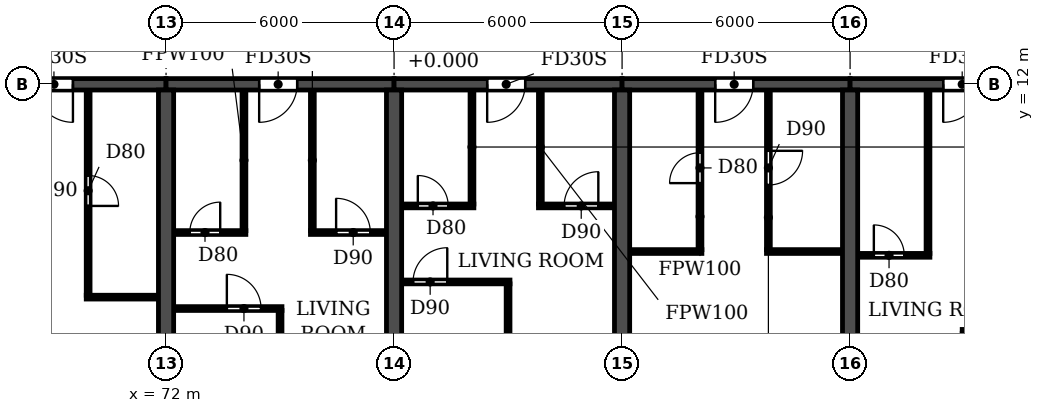
"""IFC4 building model, lengths in metres.
Left out: names, types, materials, properties, quantities, classifications, styles, units other than length and angle.
Written with IfcOpenShell. Run it as: python <this file> out.ifc"""

import sys

from ifc_helpers import new_model, si_unit, direction, frame, frame_2d, origin, place, context, subcontext, project, spatial, rectangle, extrude, element, fill, save


model = new_model("IFC4")
c1 = context("Model", 3, precision=1e-05, world=origin(), true_north=direction((0.0, 1.0)))
c2 = subcontext(c1, "Body", "Model", "MODEL_VIEW")
j1 = project(units=[si_unit("LENGTHUNIT", "METRE"), si_unit("PLANEANGLEUNIT", "RADIAN")], contexts=[c1])
p1 = place(None, origin())
s1 = spatial("IfcSite", under=j1, at=p1, CompositionType="ELEMENT")
p2 = place(p1, origin())
s2 = spatial("IfcBuilding", under=s1, at=p2, CompositionType="ELEMENT")
p3 = place(p2, frame((0.0, 0.0, 43.2)))
s3 = spatial("IfcBuildingStorey", under=s2, at=p3, CompositionType="ELEMENT", Elevation=43.2)
for number, where, z_axis, x_axis in (
    (1, (72.0, 0.2, 0.0), (0.0, 0.0, 1.0), (0.0, 1.0, 0.0)),
    (2, (78.0, 0.2, 0.0), (0.0, 0.0, 1.0), (0.0, 1.0, 0.0)),
    (3, (84.0, 0.2, 0.0), (0.0, 0.0, 1.0), (0.0, 1.0, 0.0)),
    (4, (90.0, 0.2, 0.0), (0.0, 0.0, 1.0), (0.0, 1.0, 0.0)),
):
    element("IfcWall", number, at=place(p3, frame(where, z_axis=z_axis, x_axis=x_axis)), inside=s3, PredefinedType="SHEAR", context=c2, shape_type="SweptSolid", body=[
        extrude(rectangle(XDim=11.65, YDim=0.4, at=frame_2d((5.825, 0.0))), origin(), (0.0, 0.0, 1.0), 3.05),
    ])
p4 = place(p3, frame((66.0, 12.0, 0.0), z_axis=(0.0, 0.0, 1.0), x_axis=(1.0, 0.0, 0.0)))
e5 = element("IfcWall", 5, at=p4, inside=s3, PredefinedType="SHEAR", context=c2, shape_type="SweptSolid", body=[
    extrude(rectangle(XDim=6.0, YDim=0.3, at=frame_2d((3.0, 0.0))), origin(), (0.0, 0.0, 1.0), 2.45),
])
p5 = place(p4, frame((2.55, 0.0, 0.0)))
e6 = element("IfcOpeningElement", 6, at=p5, cuts=e5, PredefinedType="OPENING", context=c2, shape_type="SweptSolid", body=[
    extrude(rectangle(XDim=1.0, YDim=2.1, at=frame_2d((0.5, 1.05))), frame((0.0, 0.16, 0.0), z_axis=(0.0, -1.0, 0.0), x_axis=(1.0, 0.0, 0.0)), (0.0, 0.0, 1.0), 0.32),
])
p6 = place(p3, frame((72.0, 12.0, 0.0), z_axis=(0.0, 0.0, 1.0), x_axis=(1.0, 0.0, 0.0)))
e7 = element("IfcWall", 7, at=p6, inside=s3, PredefinedType="SHEAR", context=c2, shape_type="SweptSolid", body=[
    extrude(rectangle(XDim=6.0, YDim=0.3, at=frame_2d((3.0, 0.0))), origin(), (0.0, 0.0, 1.0), 2.45),
])
p7 = place(p6, frame((2.45, 0.0, 0.0)))
e8 = element("IfcOpeningElement", 8, at=p7, cuts=e7, PredefinedType="OPENING", context=c2, shape_type="SweptSolid", body=[
    extrude(rectangle(XDim=1.0, YDim=2.1, at=frame_2d((0.5, 1.05))), frame((0.0, 0.16, 0.0), z_axis=(0.0, -1.0, 0.0), x_axis=(1.0, 0.0, 0.0)), (0.0, 0.0, 1.0), 0.32),
])
p8 = place(p3, frame((78.0, 12.0, 0.0), z_axis=(0.0, 0.0, 1.0), x_axis=(1.0, 0.0, 0.0)))
e9 = element("IfcWall", 9, at=p8, inside=s3, PredefinedType="SHEAR", context=c2, shape_type="SweptSolid", body=[
    extrude(rectangle(XDim=6.0, YDim=0.3, at=frame_2d((3.0, 0.0))), origin(), (0.0, 0.0, 1.0), 2.45),
])
p9 = place(p8, frame((2.45, 0.0, 0.0)))
e10 = element("IfcOpeningElement", 10, at=p9, cuts=e9, PredefinedType="OPENING", context=c2, shape_type="SweptSolid", body=[
    extrude(rectangle(XDim=1.0, YDim=2.1, at=frame_2d((0.5, 1.05))), frame((0.0, 0.16, 0.0), z_axis=(0.0, -1.0, 0.0), x_axis=(1.0, 0.0, 0.0)), (0.0, 0.0, 1.0), 0.32),
])
p10 = place(p3, frame((84.0, 12.0, 0.0), z_axis=(0.0, 0.0, 1.0), x_axis=(1.0, 0.0, 0.0)))
e11 = element("IfcWall", 11, at=p10, inside=s3, PredefinedType="SHEAR", context=c2, shape_type="SweptSolid", body=[
    extrude(rectangle(XDim=6.0, YDim=0.3, at=frame_2d((3.0, 0.0))), origin(), (0.0, 0.0, 1.0), 2.45),
])
p11 = place(p10, frame((2.45, 0.0, 0.0)))
e12 = element("IfcOpeningElement", 12, at=p11, cuts=e11, PredefinedType="OPENING", context=c2, shape_type="SweptSolid", body=[
    extrude(rectangle(XDim=1.0, YDim=2.1, at=frame_2d((0.5, 1.05))), frame((0.0, 0.16, 0.0), z_axis=(0.0, -1.0, 0.0), x_axis=(1.0, 0.0, 0.0)), (0.0, 0.0, 1.0), 0.32),
])
p12 = place(p3, frame((90.0, 12.0, 0.0), z_axis=(0.0, 0.0, 1.0), x_axis=(1.0, 0.0, 0.0)))
e13 = element("IfcWall", 13, at=p12, inside=s3, PredefinedType="SHEAR", context=c2, shape_type="SweptSolid", body=[
    extrude(rectangle(XDim=6.0, YDim=0.3, at=frame_2d((3.0, 0.0))), origin(), (0.0, 0.0, 1.0), 2.45),
])
p13 = place(p12, frame((2.45, 0.0, 0.0)))
e14 = element("IfcOpeningElement", 14, at=p13, cuts=e13, PredefinedType="OPENING", context=c2, shape_type="SweptSolid", body=[
    extrude(rectangle(XDim=1.0, YDim=2.1, at=frame_2d((0.5, 1.05))), frame((0.0, 0.16, 0.0), z_axis=(0.0, -1.0, 0.0), x_axis=(1.0, 0.0, 0.0)), (0.0, 0.0, 1.0), 0.32),
])
p14 = place(p3, frame((92.95, 5.5, 0.0), z_axis=(0.0, 0.0, 1.0), x_axis=(1.0, 0.0, 0.0)))
e15 = element("IfcWall", 15, at=p14, inside=s3, PredefinedType="PARTITIONING", context=c2, shape_type="SweptSolid", body=[
    extrude(rectangle(XDim=2.84, YDim=0.1, at=frame_2d((1.42, 0.0))), origin(), (0.0, 0.0, 1.0), 3.05),
])
p15 = place(p14, frame((1.65, 0.0, 0.0)))
e16 = element("IfcOpeningElement", 16, at=p15, cuts=e15, PredefinedType="OPENING", context=c2, shape_type="SweptSolid", body=[
    extrude(rectangle(XDim=0.9, YDim=2.1, at=frame_2d((0.45, 1.05))), frame((0.0, 0.06, 0.0), z_axis=(0.0, -1.0, 0.0), x_axis=(1.0, 0.0, 0.0)), (0.0, 0.0, 1.0), 0.12),
])
p16 = place(p3, frame((72.21, 6.1, 0.0), z_axis=(0.0, 0.0, 1.0), x_axis=(1.0, 0.0, 0.0)))
e17 = element("IfcWall", 17, at=p16, inside=s3, PredefinedType="PARTITIONING", context=c2, shape_type="SweptSolid", body=[
    extrude(rectangle(XDim=2.84, YDim=0.1, at=frame_2d((1.42, 0.0))), origin(), (0.0, 0.0, 1.0), 3.05),
])
p17 = place(p16, frame((1.39, 0.0, 0.0)))
e18 = element("IfcOpeningElement", 18, at=p17, cuts=e17, PredefinedType="OPENING", context=c2, shape_type="SweptSolid", body=[
    extrude(rectangle(XDim=0.9, YDim=2.1, at=frame_2d((0.45, 1.05))), frame((0.0, 0.06, 0.0), z_axis=(0.0, -1.0, 0.0), x_axis=(1.0, 0.0, 0.0)), (0.0, 0.0, 1.0), 0.12),
])
p18 = place(p3, frame((69.9, 6.4, 0.0), z_axis=(0.0, 0.0, 1.0), x_axis=(1.0, 0.0, 0.0)))
e19 = element("IfcWall", 19, at=p18, inside=s3, PredefinedType="PARTITIONING", context=c2, shape_type="SweptSolid", body=[
    extrude(rectangle(XDim=1.89, YDim=0.1, at=frame_2d((0.945, 0.0))), origin(), (0.0, 0.0, 1.0), 3.05),
])
p19 = place(p3, frame((78.21, 6.8, 0.0), z_axis=(0.0, 0.0, 1.0), x_axis=(1.0, 0.0, 0.0)))
e20 = element("IfcWall", 20, at=p19, inside=s3, PredefinedType="PARTITIONING", context=c2, shape_type="SweptSolid", body=[
    extrude(rectangle(XDim=2.84, YDim=0.1, at=frame_2d((1.42, 0.0))), origin(), (0.0, 0.0, 1.0), 3.05),
])
p20 = place(p19, frame((0.29, 0.0, 0.0)))
e21 = element("IfcOpeningElement", 21, at=p20, cuts=e20, PredefinedType="OPENING", context=c2, shape_type="SweptSolid", body=[
    extrude(rectangle(XDim=0.9, YDim=2.1, at=frame_2d((0.45, 1.05))), frame((0.0, 0.06, 0.0), z_axis=(0.0, -1.0, 0.0), x_axis=(1.0, 0.0, 0.0)), (0.0, 0.0, 1.0), 0.12),
])
p21 = place(p3, frame((90.21, 7.5, 0.0), z_axis=(0.0, 0.0, 1.0), x_axis=(1.0, 0.0, 0.0)))
e22 = element("IfcWall", 22, at=p21, inside=s3, PredefinedType="PARTITIONING", context=c2, shape_type="SweptSolid", body=[
    extrude(rectangle(XDim=1.89, YDim=0.1, at=frame_2d((0.945, 0.0))), origin(), (0.0, 0.0, 1.0), 3.05),
])
p22 = place(p21, frame((0.415, 0.0, 0.0)))
e23 = element("IfcOpeningElement", 23, at=p22, cuts=e22, PredefinedType="OPENING", context=c2, shape_type="SweptSolid", body=[
    extrude(rectangle(XDim=0.8, YDim=2.1, at=frame_2d((0.4, 1.05))), frame((0.0, 0.06, 0.0), z_axis=(0.0, -1.0, 0.0), x_axis=(1.0, 0.0, 0.0)), (0.0, 0.0, 1.0), 0.12),
])
p23 = place(p3, frame((84.21, 7.6, 0.0), z_axis=(0.0, 0.0, 1.0), x_axis=(1.0, 0.0, 0.0)))
e24 = element("IfcWall", 24, at=p23, inside=s3, PredefinedType="PARTITIONING", context=c2, shape_type="SweptSolid", body=[
    extrude(rectangle(XDim=1.89, YDim=0.1, at=frame_2d((0.945, 0.0))), origin(), (0.0, 0.0, 1.0), 3.05),
])
p24 = place(p3, frame((87.8, 7.6, 0.0), z_axis=(0.0, 0.0, 1.0), x_axis=(1.0, 0.0, 0.0)))
e25 = element("IfcWall", 25, at=p24, inside=s3, PredefinedType="PARTITIONING", context=c2, shape_type="SweptSolid", body=[
    extrude(rectangle(XDim=1.99, YDim=0.1, at=frame_2d((0.995, 0.0))), origin(), (0.0, 0.0, 1.0), 3.05),
])
p25 = place(p3, frame((72.21, 8.1, 0.0), z_axis=(0.0, 0.0, 1.0), x_axis=(1.0, 0.0, 0.0)))
e26 = element("IfcWall", 26, at=p25, inside=s3, PredefinedType="PARTITIONING", context=c2, shape_type="SweptSolid", body=[
    extrude(rectangle(XDim=1.89, YDim=0.1, at=frame_2d((0.945, 0.0))), origin(), (0.0, 0.0, 1.0), 3.05),
])
p26 = place(p25, frame((0.415, 0.0, 0.0)))
e27 = element("IfcOpeningElement", 27, at=p26, cuts=e26, PredefinedType="OPENING", context=c2, shape_type="SweptSolid", body=[
    extrude(rectangle(XDim=0.8, YDim=2.1, at=frame_2d((0.4, 1.05))), frame((0.0, 0.06, 0.0), z_axis=(0.0, -1.0, 0.0), x_axis=(1.0, 0.0, 0.0)), (0.0, 0.0, 1.0), 0.12),
])
p27 = place(p3, frame((75.8, 8.1, 0.0), z_axis=(0.0, 0.0, 1.0), x_axis=(1.0, 0.0, 0.0)))
e28 = element("IfcWall", 28, at=p27, inside=s3, PredefinedType="PARTITIONING", context=c2, shape_type="SweptSolid", body=[
    extrude(rectangle(XDim=1.99, YDim=0.1, at=frame_2d((0.995, 0.0))), origin(), (0.0, 0.0, 1.0), 3.05),
])
p28 = place(p27, frame((0.675, 0.0, 0.0)))
e29 = element("IfcOpeningElement", 29, at=p28, cuts=e28, PredefinedType="OPENING", context=c2, shape_type="SweptSolid", body=[
    extrude(rectangle(XDim=0.9, YDim=2.1, at=frame_2d((0.45, 1.05))), frame((0.0, 0.06, 0.0), z_axis=(0.0, -1.0, 0.0), x_axis=(1.0, 0.0, 0.0)), (0.0, 0.0, 1.0), 0.12),
])
p29 = place(p3, frame((78.21, 8.8, 0.0), z_axis=(0.0, 0.0, 1.0), x_axis=(1.0, 0.0, 0.0)))
e30 = element("IfcWall", 30, at=p29, inside=s3, PredefinedType="PARTITIONING", context=c2, shape_type="SweptSolid", body=[
    extrude(rectangle(XDim=1.89, YDim=0.1, at=frame_2d((0.945, 0.0))), origin(), (0.0, 0.0, 1.0), 3.05),
])
p30 = place(p29, frame((0.415, 0.0, 0.0)))
e31 = element("IfcOpeningElement", 31, at=p30, cuts=e30, PredefinedType="OPENING", context=c2, shape_type="SweptSolid", body=[
    extrude(rectangle(XDim=0.8, YDim=2.1, at=frame_2d((0.4, 1.05))), frame((0.0, 0.06, 0.0), z_axis=(0.0, -1.0, 0.0), x_axis=(1.0, 0.0, 0.0)), (0.0, 0.0, 1.0), 0.12),
])
p31 = place(p3, frame((81.8, 8.8, 0.0), z_axis=(0.0, 0.0, 1.0), x_axis=(1.0, 0.0, 0.0)))
e32 = element("IfcWall", 32, at=p31, inside=s3, PredefinedType="PARTITIONING", context=c2, shape_type="SweptSolid", body=[
    extrude(rectangle(XDim=1.99, YDim=0.1, at=frame_2d((0.995, 0.0))), origin(), (0.0, 0.0, 1.0), 3.05),
])
p32 = place(p31, frame((0.675, 0.0, 0.0)))
e33 = element("IfcOpeningElement", 33, at=p32, cuts=e32, PredefinedType="OPENING", context=c2, shape_type="SweptSolid", body=[
    extrude(rectangle(XDim=0.9, YDim=2.1, at=frame_2d((0.45, 1.05))), frame((0.0, 0.06, 0.0), z_axis=(0.0, -1.0, 0.0), x_axis=(1.0, 0.0, 0.0)), (0.0, 0.0, 1.0), 0.12),
])
p33 = place(p3, frame((69.95, 6.45, 0.0), z_axis=(0.0, 0.0, 1.0), x_axis=(0.0, 1.0, 0.0)))
e34 = element("IfcWall", 34, at=p33, inside=s3, PredefinedType="PARTITIONING", context=c2, shape_type="SweptSolid", body=[
    extrude(rectangle(XDim=5.39, YDim=0.1, at=frame_2d((2.695, 0.0))), origin(), (0.0, 0.0, 1.0), 3.05),
])
p34 = place(p33, frame((2.35, 0.0, 0.0)))
e35 = element("IfcOpeningElement", 35, at=p34, cuts=e34, PredefinedType="OPENING", context=c2, shape_type="SweptSolid", body=[
    extrude(rectangle(XDim=0.8, YDim=2.1, at=frame_2d((0.4, 1.05))), frame((0.0, 0.06, 0.0), z_axis=(0.0, -1.0, 0.0), x_axis=(1.0, 0.0, 0.0)), (0.0, 0.0, 1.0), 0.12),
])
p35 = place(p3, frame((74.05, 8.15, 0.0), z_axis=(0.0, 0.0, 1.0), x_axis=(0.0, 1.0, 0.0)))
e36 = element("IfcWall", 36, at=p35, inside=s3, PredefinedType="PARTITIONING", context=c2, shape_type="SweptSolid", body=[
    extrude(rectangle(XDim=3.69, YDim=0.1, at=frame_2d((1.845, 0.0))), origin(), (0.0, 0.0, 1.0), 3.05),
])
p36 = place(p3, frame((75.0, 0.06, 0.0), z_axis=(0.0, 0.0, 1.0), x_axis=(0.0, 1.0, 0.0)))
e37 = element("IfcWall", 37, at=p36, inside=s3, PredefinedType="PARTITIONING", context=c2, shape_type="SweptSolid", body=[
    extrude(rectangle(XDim=5.99, YDim=0.1, at=frame_2d((2.995, 0.0))), origin(), (0.0, 0.0, 1.0), 3.05),
])
p37 = place(p3, frame((75.85, 8.15, 0.0), z_axis=(0.0, 0.0, 1.0), x_axis=(0.0, 1.0, 0.0)))
e38 = element("IfcWall", 38, at=p37, inside=s3, PredefinedType="PARTITIONING", context=c2, shape_type="SweptSolid", body=[
    extrude(rectangle(XDim=3.69, YDim=0.1, at=frame_2d((1.845, 0.0))), origin(), (0.0, 0.0, 1.0), 3.05),
])
p38 = place(p3, frame((80.05, 8.85, 0.0), z_axis=(0.0, 0.0, 1.0), x_axis=(0.0, 1.0, 0.0)))
e39 = element("IfcWall", 39, at=p38, inside=s3, PredefinedType="PARTITIONING", context=c2, shape_type="SweptSolid", body=[
    extrude(rectangle(XDim=2.99, YDim=0.1, at=frame_2d((1.495, 0.0))), origin(), (0.0, 0.0, 1.0), 3.05),
])
p39 = place(p3, frame((81.0, 0.06, 0.0), z_axis=(0.0, 0.0, 1.0), x_axis=(0.0, 1.0, 0.0)))
e40 = element("IfcWall", 40, at=p39, inside=s3, PredefinedType="PARTITIONING", context=c2, shape_type="SweptSolid", body=[
    extrude(rectangle(XDim=6.69, YDim=0.1, at=frame_2d((3.345, 0.0))), origin(), (0.0, 0.0, 1.0), 3.05),
])
p40 = place(p3, frame((81.85, 8.85, 0.0), z_axis=(0.0, 0.0, 1.0), x_axis=(0.0, 1.0, 0.0)))
e41 = element("IfcWall", 41, at=p40, inside=s3, PredefinedType="PARTITIONING", context=c2, shape_type="SweptSolid", body=[
    extrude(rectangle(XDim=2.99, YDim=0.1, at=frame_2d((1.495, 0.0))), origin(), (0.0, 0.0, 1.0), 3.05),
])
p41 = place(p3, frame((86.05, 7.65, 0.0), z_axis=(0.0, 0.0, 1.0), x_axis=(0.0, 1.0, 0.0)))
e42 = element("IfcWall", 42, at=p41, inside=s3, PredefinedType="PARTITIONING", context=c2, shape_type="SweptSolid", body=[
    extrude(rectangle(XDim=4.19, YDim=0.1, at=frame_2d((2.095, 0.0))), origin(), (0.0, 0.0, 1.0), 3.05),
])
p42 = place(p41, frame((1.75, 0.0, 0.0)))
e43 = element("IfcOpeningElement", 43, at=p42, cuts=e42, PredefinedType="OPENING", context=c2, shape_type="SweptSolid", body=[
    extrude(rectangle(XDim=0.8, YDim=2.1, at=frame_2d((0.4, 1.05))), frame((0.0, 0.06, 0.0), z_axis=(0.0, -1.0, 0.0), x_axis=(1.0, 0.0, 0.0)), (0.0, 0.0, 1.0), 0.12),
])
p43 = place(p3, frame((87.85, 7.65, 0.0), z_axis=(0.0, 0.0, 1.0), x_axis=(0.0, 1.0, 0.0)))
e44 = element("IfcWall", 44, at=p43, inside=s3, PredefinedType="PARTITIONING", context=c2, shape_type="SweptSolid", body=[
    extrude(rectangle(XDim=4.19, YDim=0.1, at=frame_2d((2.095, 0.0))), origin(), (0.0, 0.0, 1.0), 3.05),
])
p44 = place(p43, frame((1.7, 0.0, 0.0)))
e45 = element("IfcOpeningElement", 45, at=p44, cuts=e44, PredefinedType="OPENING", context=c2, shape_type="SweptSolid", body=[
    extrude(rectangle(XDim=0.9, YDim=2.1, at=frame_2d((0.45, 1.05))), frame((0.0, 0.06, 0.0), z_axis=(0.0, -1.0, 0.0), x_axis=(1.0, 0.0, 0.0)), (0.0, 0.0, 1.0), 0.12),
])
p45 = place(p3, frame((92.05, 7.55, 0.0), z_axis=(0.0, 0.0, 1.0), x_axis=(0.0, 1.0, 0.0)))
e46 = element("IfcWall", 46, at=p45, inside=s3, PredefinedType="PARTITIONING", context=c2, shape_type="SweptSolid", body=[
    extrude(rectangle(XDim=4.29, YDim=0.1, at=frame_2d((2.145, 0.0))), origin(), (0.0, 0.0, 1.0), 3.05),
])
p46 = place(p5, frame((1.0, 0.0, 0.0), z_axis=(0.0, 0.0, 1.0), x_axis=(-1.0, 0.0, 0.0)))
e47 = element("IfcDoor", 47, at=p46, inside=s3, OperationType="SINGLE_SWING_LEFT", PredefinedType="DOOR", context=c2, shape_type="SweptSolid", body=[
    extrude(rectangle(XDim=1.0, YDim=2.1, at=frame_2d((0.5, 1.05))), frame((0.0, 0.025, 0.0), z_axis=(0.0, -1.0, 0.0), x_axis=(1.0, 0.0, 0.0)), (0.0, 0.0, 1.0), 0.05),
])
fill(e6, e47)
p47 = place(p34, frame((0.8, 0.0, 0.0), z_axis=(0.0, 0.0, 1.0), x_axis=(-1.0, 0.0, 0.0)))
e48 = element("IfcDoor", 48, at=p47, inside=s3, OperationType="SINGLE_SWING_RIGHT", PredefinedType="DOOR", context=c2, shape_type="SweptSolid", body=[
    extrude(rectangle(XDim=0.8, YDim=2.1, at=frame_2d((0.4, 1.05))), frame((0.0, 0.025, 0.0), z_axis=(0.0, -1.0, 0.0), x_axis=(1.0, 0.0, 0.0)), (0.0, 0.0, 1.0), 0.05),
])
fill(e35, e48)
p48 = place(p26, origin())
e49 = element("IfcDoor", 49, at=p48, inside=s3, OperationType="SINGLE_SWING_RIGHT", PredefinedType="DOOR", context=c2, shape_type="SweptSolid", body=[
    extrude(rectangle(XDim=0.8, YDim=2.1, at=frame_2d((0.4, 1.05))), frame((0.0, 0.025, 0.0), z_axis=(0.0, -1.0, 0.0), x_axis=(1.0, 0.0, 0.0)), (0.0, 0.0, 1.0), 0.05),
])
fill(e27, e49)
p49 = place(p17, origin())
e50 = element("IfcDoor", 50, at=p49, inside=s3, OperationType="SINGLE_SWING_LEFT", PredefinedType="DOOR", context=c2, shape_type="SweptSolid", body=[
    extrude(rectangle(XDim=0.9, YDim=2.1, at=frame_2d((0.45, 1.05))), frame((0.0, 0.025, 0.0), z_axis=(0.0, -1.0, 0.0), x_axis=(1.0, 0.0, 0.0)), (0.0, 0.0, 1.0), 0.05),
])
fill(e18, e50)
p50 = place(p7, frame((1.0, 0.0, 0.0), z_axis=(0.0, 0.0, 1.0), x_axis=(-1.0, 0.0, 0.0)))
e51 = element("IfcDoor", 51, at=p50, inside=s3, OperationType="SINGLE_SWING_RIGHT", PredefinedType="DOOR", context=c2, shape_type="SweptSolid", body=[
    extrude(rectangle(XDim=1.0, YDim=2.1, at=frame_2d((0.5, 1.05))), frame((0.0, 0.025, 0.0), z_axis=(0.0, -1.0, 0.0), x_axis=(1.0, 0.0, 0.0)), (0.0, 0.0, 1.0), 0.05),
])
fill(e8, e51)
p51 = place(p28, origin())
e52 = element("IfcDoor", 52, at=p51, inside=s3, OperationType="SINGLE_SWING_LEFT", PredefinedType="DOOR", context=c2, shape_type="SweptSolid", body=[
    extrude(rectangle(XDim=0.9, YDim=2.1, at=frame_2d((0.45, 1.05))), frame((0.0, 0.025, 0.0), z_axis=(0.0, -1.0, 0.0), x_axis=(1.0, 0.0, 0.0)), (0.0, 0.0, 1.0), 0.05),
])
fill(e29, e52)
p52 = place(p20, origin())
e53 = element("IfcDoor", 53, at=p52, inside=s3, OperationType="SINGLE_SWING_RIGHT", PredefinedType="DOOR", context=c2, shape_type="SweptSolid", body=[
    extrude(rectangle(XDim=0.9, YDim=2.1, at=frame_2d((0.45, 1.05))), frame((0.0, 0.025, 0.0), z_axis=(0.0, -1.0, 0.0), x_axis=(1.0, 0.0, 0.0)), (0.0, 0.0, 1.0), 0.05),
])
fill(e21, e53)
p53 = place(p30, origin())
e54 = element("IfcDoor", 54, at=p53, inside=s3, OperationType="SINGLE_SWING_LEFT", PredefinedType="DOOR", context=c2, shape_type="SweptSolid", body=[
    extrude(rectangle(XDim=0.8, YDim=2.1, at=frame_2d((0.4, 1.05))), frame((0.0, 0.025, 0.0), z_axis=(0.0, -1.0, 0.0), x_axis=(1.0, 0.0, 0.0)), (0.0, 0.0, 1.0), 0.05),
])
fill(e31, e54)
p54 = place(p9, frame((1.0, 0.0, 0.0), z_axis=(0.0, 0.0, 1.0), x_axis=(-1.0, 0.0, 0.0)))
e55 = element("IfcDoor", 55, at=p54, inside=s3, OperationType="SINGLE_SWING_RIGHT", PredefinedType="DOOR", context=c2, shape_type="SweptSolid", body=[
    extrude(rectangle(XDim=1.0, YDim=2.1, at=frame_2d((0.5, 1.05))), frame((0.0, 0.025, 0.0), z_axis=(0.0, -1.0, 0.0), x_axis=(1.0, 0.0, 0.0)), (0.0, 0.0, 1.0), 0.05),
])
fill(e10, e55)
p55 = place(p32, origin())
e56 = element("IfcDoor", 56, at=p55, inside=s3, OperationType="SINGLE_SWING_RIGHT", PredefinedType="DOOR", context=c2, shape_type="SweptSolid", body=[
    extrude(rectangle(XDim=0.9, YDim=2.1, at=frame_2d((0.45, 1.05))), frame((0.0, 0.025, 0.0), z_axis=(0.0, -1.0, 0.0), x_axis=(1.0, 0.0, 0.0)), (0.0, 0.0, 1.0), 0.05),
])
fill(e33, e56)
p56 = place(p42, origin())
e57 = element("IfcDoor", 57, at=p56, inside=s3, OperationType="SINGLE_SWING_LEFT", PredefinedType="DOOR", context=c2, shape_type="SweptSolid", body=[
    extrude(rectangle(XDim=0.8, YDim=2.1, at=frame_2d((0.4, 1.05))), frame((0.0, 0.025, 0.0), z_axis=(0.0, -1.0, 0.0), x_axis=(1.0, 0.0, 0.0)), (0.0, 0.0, 1.0), 0.05),
])
fill(e43, e57)
p57 = place(p11, frame((1.0, 0.0, 0.0), z_axis=(0.0, 0.0, 1.0), x_axis=(-1.0, 0.0, 0.0)))
e58 = element("IfcDoor", 58, at=p57, inside=s3, OperationType="SINGLE_SWING_RIGHT", PredefinedType="DOOR", context=c2, shape_type="SweptSolid", body=[
    extrude(rectangle(XDim=1.0, YDim=2.1, at=frame_2d((0.5, 1.05))), frame((0.0, 0.025, 0.0), z_axis=(0.0, -1.0, 0.0), x_axis=(1.0, 0.0, 0.0)), (0.0, 0.0, 1.0), 0.05),
])
fill(e12, e58)
p58 = place(p44, frame((0.9, 0.0, 0.0), z_axis=(0.0, 0.0, 1.0), x_axis=(-1.0, 0.0, 0.0)))
e59 = element("IfcDoor", 59, at=p58, inside=s3, OperationType="SINGLE_SWING_LEFT", PredefinedType="DOOR", context=c2, shape_type="SweptSolid", body=[
    extrude(rectangle(XDim=0.9, YDim=2.1, at=frame_2d((0.45, 1.05))), frame((0.0, 0.025, 0.0), z_axis=(0.0, -1.0, 0.0), x_axis=(1.0, 0.0, 0.0)), (0.0, 0.0, 1.0), 0.05),
])
fill(e45, e59)
p59 = place(p22, origin())
e60 = element("IfcDoor", 60, at=p59, inside=s3, OperationType="SINGLE_SWING_LEFT", PredefinedType="DOOR", context=c2, shape_type="SweptSolid", body=[
    extrude(rectangle(XDim=0.8, YDim=2.1, at=frame_2d((0.4, 1.05))), frame((0.0, 0.025, 0.0), z_axis=(0.0, -1.0, 0.0), x_axis=(1.0, 0.0, 0.0)), (0.0, 0.0, 1.0), 0.05),
])
fill(e23, e60)
p60 = place(p13, frame((1.0, 0.0, 0.0), z_axis=(0.0, 0.0, 1.0), x_axis=(-1.0, 0.0, 0.0)))
e61 = element("IfcDoor", 61, at=p60, inside=s3, OperationType="SINGLE_SWING_RIGHT", PredefinedType="DOOR", context=c2, shape_type="SweptSolid", body=[
    extrude(rectangle(XDim=1.0, YDim=2.1, at=frame_2d((0.5, 1.05))), frame((0.0, 0.025, 0.0), z_axis=(0.0, -1.0, 0.0), x_axis=(1.0, 0.0, 0.0)), (0.0, 0.0, 1.0), 0.05),
])
fill(e14, e61)
save(model, sys.argv[1])
